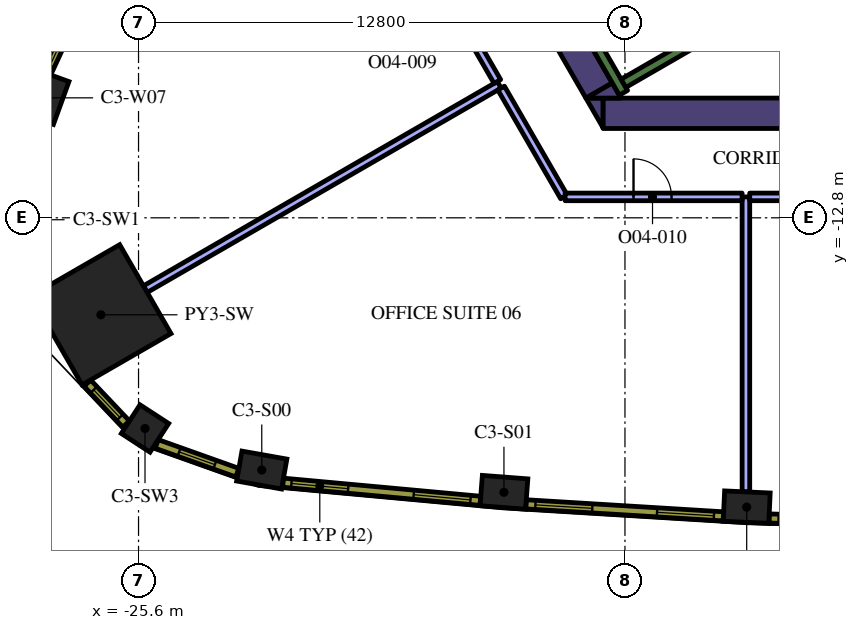
"""IFC4 building model, lengths in metres.
Left out: names, types, materials, properties, quantities, classifications, styles, units other than length and angle.
Written with IfcOpenShell. Run it as: python <this file> out.ifc"""

import sys

from ifc_helpers import new_model, si_unit, direction, frame, frame_2d, origin, origin_2d, place, context, subcontext, project, spatial, polyline, rectangle, outline, extrude, element, fill, save


model = new_model("IFC4")
c1 = context("Model", 3, precision=1e-05, world=origin(), true_north=direction((0.0, 1.0)))
c2 = subcontext(c1, "Body", "Model", "MODEL_VIEW")
j1 = project(units=[si_unit("LENGTHUNIT", "METRE"), si_unit("PLANEANGLEUNIT", "RADIAN")], contexts=[c1])
p1 = place(None, origin())
s1 = spatial("IfcSite", under=j1, at=p1, CompositionType="ELEMENT")
p2 = place(p1, origin())
s2 = spatial("IfcBuilding", under=s1, at=p2, CompositionType="ELEMENT")
p3 = place(p2, frame((0.0, 0.0, 179.4)))
s3 = spatial("IfcBuildingStorey", under=s2, at=p3, CompositionType="ELEMENT", Elevation=179.4)
p4 = place(p3, frame((-26.591, -15.352, 0.0), z_axis=(0.0, 0.0, 1.0), x_axis=(-0.866025403784, -0.5, 0.0)))
e1 = element("IfcColumn", 1, at=p4, inside=s3, PredefinedType="COLUMN", context=c2, shape_type="SweptSolid", body=[
    extrude(rectangle(XDim=2.7, YDim=2.7, at=origin_2d()), origin(), (0.0, 0.0, 1.0), 4.2),
])
for number, where, z_axis, x_axis in (
    (2, (-22.357, -19.437, 0.0), (0.0, 0.0, 1.0), (0.985, -0.175, 0.0)),
    (3, (-15.985, -20.022, 0.0), (0.0, 0.0, 1.0), (0.997, -0.076, 0.0)),
    (4, (-9.597, -20.413, 0.0), (0.0, 0.0, 1.0), (0.999, -0.046, 0.0)),
    (5, (-28.012, -9.644, 0.0), (0.0, 0.0, 1.0), (-0.341, -0.94, 0.0)),
):
    element("IfcColumn", number, at=place(p3, frame(where, z_axis=z_axis, x_axis=x_axis)), inside=s3, PredefinedType="COLUMN", context=c2, shape_type="SweptSolid", body=[
        extrude(rectangle(XDim=1.2, YDim=0.8, at=origin_2d()), origin(), (0.0, 0.0, 1.0), 4.2),
    ])
p5 = place(p3, frame((-25.43, -18.344, 0.0), z_axis=(0.0, 0.0, 1.0), x_axis=(0.838094050847, -0.545525766518, 0.0)))
e6 = element("IfcColumn", 6, at=p5, inside=s3, PredefinedType="COLUMN", context=c2, shape_type="SweptSolid", body=[
    extrude(rectangle(XDim=0.9, YDim=0.9, at=origin_2d()), origin(), (0.0, 0.0, 1.0), 4.2),
])
p6 = place(p3, frame((-13.378, -10.05, 0.0), z_axis=(0.0, 0.0, 1.0), x_axis=(1.0, 0.0, 0.0)))
e7 = element("IfcWall", 7, at=p6, inside=s3, PredefinedType="SOLIDWALL", context=c2, shape_type="SweptSolid", body=[
    extrude(rectangle(XDim=22.282, YDim=0.8, at=frame_2d((11.141, 0.0))), origin(), (0.0, 0.0, 1.0), 4.2),
])
p7 = place(p3, origin())
e8 = element("IfcWall", 8, at=p7, inside=s3, PredefinedType="SOLIDWALL", context=c2, shape_type="SweptSolid", body=[
    extrude(outline(polyline([(-13.828, -9.65), (-13.38, -9.65), (-13.38, -10.426), (-13.828, -9.65)])), origin(), (0.0, 0.0, 1.0), 4.2),
])
p8 = place(p3, frame((-15.392, -6.14, 0.0), z_axis=(0.0, 0.0, 1.0), x_axis=(0.499984020225, -0.866034629516, 0.0)))
e9 = element("IfcWall", 9, at=p8, inside=s3, PredefinedType="SOLIDWALL", context=c2, shape_type="SweptSolid", body=[
    extrude(rectangle(XDim=3.824, YDim=0.8, at=frame_2d((1.912, 0.0))), origin(), (0.0, 0.0, 1.0), 4.2),
])
e10 = element("IfcWall", 10, at=p7, inside=s3, PredefinedType="SOLIDWALL", context=c2, shape_type="SweptSolid", body=[
    extrude(outline(polyline([(-12.904, -9.65), (-13.82, -9.65), (-13.133, -9.253), (-12.904, -9.65)])), origin(), (0.0, 0.0, 1.0), 4.2),
])
p9 = place(p3, frame((-12.84, -9.511, 0.0), z_axis=(0.0, 0.0, 1.0), x_axis=(-0.499997733992, 0.866026712061, 0.0)))
e11 = element("IfcWall", 11, at=p9, inside=s3, PredefinedType="SOLIDWALL", context=c2, shape_type="SweptSolid", body=[
    extrude(rectangle(XDim=3.634, YDim=0.25, at=frame_2d((1.817, 0.0))), origin(), (0.0, 0.0, 1.0), 4.2),
])
p10 = place(p3, frame((-12.84, -9.261, 0.0), z_axis=(0.0, 0.0, 1.0), x_axis=(0.866016039709, 0.500016218704, 0.0)))
e12 = element("IfcWall", 12, at=p10, inside=s3, PredefinedType="SOLIDWALL", context=c2, shape_type="SweptSolid", body=[
    extrude(rectangle(XDim=7.05, YDim=0.25, at=frame_2d((3.525, 0.0))), origin(), (0.0, 0.0, 1.0), 4.2),
])
p11 = place(p3, frame((-9.617, -20.011, 0.0), z_axis=(0.0, 0.0, 1.0), x_axis=(0.0, 1.0, 0.0)))
e13 = element("IfcWall", 13, at=p11, inside=s3, PredefinedType="PARTITIONING", context=c2, shape_type="SweptSolid", body=[
    extrude(rectangle(XDim=7.761, YDim=0.2, at=frame_2d((3.881, 0.0))), origin(), (0.0, 0.0, 1.0), 3.15),
])
p12 = place(p3, frame((-9.517, -12.25, 0.0), z_axis=(0.0, 0.0, 1.0), x_axis=(1.0, 0.0, 0.0)))
e14 = element("IfcWall", 14, at=p12, inside=s3, PredefinedType="PARTITIONING", context=c2, shape_type="SweptSolid", body=[
    extrude(rectangle(XDim=5.987, YDim=0.2, at=frame_2d((2.994, 0.0))), origin(), (0.0, 0.0, 1.0), 3.15),
])
p13 = place(p3, frame((-16.108, -9.3, 0.0), z_axis=(0.0, 0.0, 1.0), x_axis=(-0.866027180319, -0.499996922939, 0.0)))
e15 = element("IfcWall", 15, at=p13, inside=s3, PredefinedType="PARTITIONING", context=c2, shape_type="SweptSolid", body=[
    extrude(rectangle(XDim=10.754, YDim=0.2, at=frame_2d((5.377, 0.0))), origin(), (0.0, 0.0, 1.0), 3.15),
])
p14 = place(p3, frame((-17.796, -6.376, 0.0), z_axis=(0.0, 0.0, 1.0), x_axis=(0.500001965626, -0.866024268927, 0.0)))
e16 = element("IfcWall", 16, at=p14, inside=s3, PredefinedType="PARTITIONING", context=c2, shape_type="SweptSolid", body=[
    extrude(rectangle(XDim=3.276, YDim=0.2, at=frame_2d((1.638, 0.0))), origin(), (0.0, 0.0, 1.0), 3.15),
])
p15 = place(p14, frame((1.1, 0.0, 0.0)))
e17 = element("IfcOpeningElement", 17, at=p15, cuts=e16, PredefinedType="OPENING", context=c2, shape_type="SweptSolid", body=[
    extrude(rectangle(XDim=1.0, YDim=2.1, at=frame_2d((0.5, 1.05))), frame((0.0, 0.11, 0.0), z_axis=(0.0, -1.0, 0.0), x_axis=(1.0, 0.0, 0.0)), (0.0, 0.0, 1.0), 0.22),
])
p16 = place(p3, frame((-16.058, -9.387, 0.0), z_axis=(0.0, 0.0, 1.0), x_axis=(0.500046299512, -0.865998671098, 0.0)))
e18 = element("IfcWall", 18, at=p16, inside=s3, PredefinedType="PARTITIONING", context=c2, shape_type="SweptSolid", body=[
    extrude(rectangle(XDim=3.306, YDim=0.2, at=frame_2d((1.653, 0.0))), origin(), (0.0, 0.0, 1.0), 3.15),
])
p17 = place(p3, frame((-14.375, -12.25, 0.0), z_axis=(0.0, 0.0, 1.0), x_axis=(1.0, 0.0, 0.0)))
e19 = element("IfcWall", 19, at=p17, inside=s3, PredefinedType="PARTITIONING", context=c2, shape_type="SweptSolid", body=[
    extrude(rectangle(XDim=4.658, YDim=0.2, at=frame_2d((2.329, 0.0))), origin(), (0.0, 0.0, 1.0), 3.15),
])
p18 = place(p17, frame((1.8, 0.0, 0.0)))
e20 = element("IfcOpeningElement", 20, at=p18, cuts=e19, PredefinedType="OPENING", context=c2, shape_type="SweptSolid", body=[
    extrude(rectangle(XDim=1.0, YDim=2.1, at=frame_2d((0.5, 1.05))), frame((0.0, 0.11, 0.0), z_axis=(0.0, -1.0, 0.0), x_axis=(1.0, 0.0, 0.0)), (0.0, 0.0, 1.0), 0.22),
])
p19 = place(p3, frame((-21.797, -19.77, 0.0), z_axis=(0.0, 0.0, 1.0), x_axis=(0.995808712151, -0.091460422067, 0.0)))
e21 = element("IfcWall", 21, at=p19, inside=s3, PredefinedType="SOLIDWALL", context=c2, shape_type="SweptSolid", body=[
    extrude(rectangle(XDim=5.213, YDim=0.24, at=frame_2d((2.606, 0.0))), origin(), (0.0, 0.0, 1.0), 3.95),
])
p20 = place(p19, frame((0.221, 0.0, 0.9)))
e22 = element("IfcOpeningElement", 22, at=p20, cuts=e21, PredefinedType="OPENING", context=c2, shape_type="SweptSolid", body=[
    extrude(rectangle(XDim=1.5, YDim=2.55, at=frame_2d((0.75, 1.275))), frame((0.0, 0.13, 0.0), z_axis=(0.0, -1.0, 0.0), x_axis=(1.0, 0.0, 0.0)), (0.0, 0.0, 1.0), 0.26),
])
p21 = place(p19, frame((3.452, 0.0, 0.9)))
e23 = element("IfcOpeningElement", 23, at=p21, cuts=e21, PredefinedType="OPENING", context=c2, shape_type="SweptSolid", body=[
    extrude(rectangle(XDim=1.5, YDim=2.55, at=frame_2d((0.75, 1.275))), frame((0.0, 0.13, 0.0), z_axis=(0.0, -1.0, 0.0), x_axis=(1.0, 0.0, 0.0)), (0.0, 0.0, 1.0), 0.26),
])
p22 = place(p3, frame((-15.405, -20.338, 0.0), z_axis=(0.0, 0.0, 1.0), x_axis=(0.998135294646, -0.061040425794, 0.0)))
e24 = element("IfcWall", 24, at=p22, inside=s3, PredefinedType="SOLIDWALL", context=c2, shape_type="SweptSolid", body=[
    extrude(rectangle(XDim=5.204, YDim=0.24, at=frame_2d((2.602, 0.0))), origin(), (0.0, 0.0, 1.0), 3.95),
])
p23 = place(p22, frame((0.248, 0.0, 0.9)))
e25 = element("IfcOpeningElement", 25, at=p23, cuts=e24, PredefinedType="OPENING", context=c2, shape_type="SweptSolid", body=[
    extrude(rectangle(XDim=1.5, YDim=2.55, at=frame_2d((0.75, 1.275))), frame((0.0, 0.13, 0.0), z_axis=(0.0, -1.0, 0.0), x_axis=(1.0, 0.0, 0.0)), (0.0, 0.0, 1.0), 0.26),
])
p24 = place(p22, frame((3.455, 0.0, 0.9)))
e26 = element("IfcOpeningElement", 26, at=p24, cuts=e24, PredefinedType="OPENING", context=c2, shape_type="SweptSolid", body=[
    extrude(rectangle(XDim=1.5, YDim=2.55, at=frame_2d((0.75, 1.275))), frame((0.0, 0.13, 0.0), z_axis=(0.0, -1.0, 0.0), x_axis=(1.0, 0.0, 0.0)), (0.0, 0.0, 1.0), 0.26),
])
p25 = place(p3, frame((-9.007, -20.711, 0.0), z_axis=(0.0, 0.0, 1.0), x_axis=(0.999533441983, -0.030543384845, 0.0)))
e27 = element("IfcWall", 27, at=p25, inside=s3, PredefinedType="SOLIDWALL", context=c2, shape_type="SweptSolid", body=[
    extrude(rectangle(XDim=5.204, YDim=0.24, at=frame_2d((2.602, 0.0))), origin(), (0.0, 0.0, 1.0), 3.95),
])
p26 = place(p25, frame((0.248, 0.0, 0.9)))
e28 = element("IfcOpeningElement", 28, at=p26, cuts=e27, PredefinedType="OPENING", context=c2, shape_type="SweptSolid", body=[
    extrude(rectangle(XDim=1.5, YDim=2.55, at=frame_2d((0.75, 1.275))), frame((0.0, 0.13, 0.0), z_axis=(0.0, -1.0, 0.0), x_axis=(1.0, 0.0, 0.0)), (0.0, 0.0, 1.0), 0.26),
])
p27 = place(p25, frame((3.455, 0.0, 0.9)))
e29 = element("IfcOpeningElement", 29, at=p27, cuts=e27, PredefinedType="OPENING", context=c2, shape_type="SweptSolid", body=[
    extrude(rectangle(XDim=1.5, YDim=2.55, at=frame_2d((0.75, 1.275))), frame((0.0, 0.13, 0.0), z_axis=(0.0, -1.0, 0.0), x_axis=(1.0, 0.0, 0.0)), (0.0, 0.0, 1.0), 0.26),
])
p28 = place(p3, frame((-25.837, -4.258, 0.0), z_axis=(0.0, 0.0, 1.0), x_axis=(-0.418722559465, -0.908114209885, 0.0)))
e30 = element("IfcWall", 30, at=p28, inside=s3, PredefinedType="SOLIDWALL", context=c2, shape_type="SweptSolid", body=[
    extrude(rectangle(XDim=5.213, YDim=0.24, at=frame_2d((2.606, 0.0))), origin(), (0.0, 0.0, 1.0), 3.95),
])
p29 = place(p28, frame((0.261, 0.0, 0.9)))
e31 = element("IfcOpeningElement", 31, at=p29, cuts=e30, PredefinedType="OPENING", context=c2, shape_type="SweptSolid", body=[
    extrude(rectangle(XDim=1.5, YDim=2.55, at=frame_2d((0.75, 1.275))), frame((0.0, 0.13, 0.0), z_axis=(0.0, -1.0, 0.0), x_axis=(1.0, 0.0, 0.0)), (0.0, 0.0, 1.0), 0.26),
])
p30 = place(p28, frame((3.492, 0.0, 0.9)))
e32 = element("IfcOpeningElement", 32, at=p30, cuts=e30, PredefinedType="OPENING", context=c2, shape_type="SweptSolid", body=[
    extrude(rectangle(XDim=1.5, YDim=2.55, at=frame_2d((0.75, 1.275))), frame((0.0, 0.13, 0.0), z_axis=(0.0, -1.0, 0.0), x_axis=(1.0, 0.0, 0.0)), (0.0, 0.0, 1.0), 0.26),
])
p31 = place(p3, frame((-26.946, -17.151, 0.0), z_axis=(0.0, 0.0, 1.0), x_axis=(0.687986858937, -0.725723144133, 0.0)))
e33 = element("IfcWall", 33, at=p31, inside=s3, PredefinedType="SOLIDWALL", context=c2, shape_type="SweptSolid", body=[
    extrude(rectangle(XDim=1.481, YDim=0.24, at=frame_2d((0.741, 0.0))), origin(), (0.0, 0.0, 1.0), 3.95),
])
p32 = place(p31, frame((0.241, 0.0, 0.9)))
e34 = element("IfcOpeningElement", 34, at=p32, cuts=e33, PredefinedType="OPENING", context=c2, shape_type="SweptSolid", body=[
    extrude(rectangle(XDim=1.0, YDim=2.55, at=frame_2d((0.5, 1.275))), frame((0.0, 0.13, 0.0), z_axis=(0.0, -1.0, 0.0), x_axis=(1.0, 0.0, 0.0)), (0.0, 0.0, 1.0), 0.26),
])
p33 = place(p3, frame((-25.121, -18.751, 0.0), z_axis=(0.0, 0.0, 1.0), x_axis=(0.942099727267, -0.335332825539, 0.0)))
e35 = element("IfcWall", 35, at=p33, inside=s3, PredefinedType="SOLIDWALL", context=c2, shape_type="SweptSolid", body=[
    extrude(rectangle(XDim=2.25, YDim=0.24, at=frame_2d((1.125, 0.0))), origin(), (0.0, 0.0, 1.0), 3.95),
])
p34 = place(p33, frame((0.625, 0.0, 0.9)))
e36 = element("IfcOpeningElement", 36, at=p34, cuts=e35, PredefinedType="OPENING", context=c2, shape_type="SweptSolid", body=[
    extrude(rectangle(XDim=1.0, YDim=2.55, at=frame_2d((0.5, 1.275))), frame((0.0, 0.13, 0.0), z_axis=(0.0, -1.0, 0.0), x_axis=(1.0, 0.0, 0.0)), (0.0, 0.0, 1.0), 0.26),
])
p35 = place(p18, origin())
e37 = element("IfcDoor", 37, at=p35, inside=s3, OperationType="SINGLE_SWING_LEFT", PredefinedType="DOOR", context=c2, shape_type="SweptSolid", body=[
    extrude(rectangle(XDim=1.0, YDim=2.1, at=frame_2d((0.5, 1.05))), frame((0.0, 0.025, 0.0), z_axis=(0.0, -1.0, 0.0), x_axis=(1.0, 0.0, 0.0)), (0.0, 0.0, 1.0), 0.05),
])
fill(e20, e37)
p36 = place(p20, origin())
e38 = element("IfcWindow", 38, at=p36, inside=s3, PartitioningType="SINGLE_PANEL", PredefinedType="WINDOW", context=c2, shape_type="SweptSolid", body=[
    extrude(rectangle(XDim=1.5, YDim=2.55, at=frame_2d((0.75, 1.275))), frame((0.0, 0.04, 0.0), z_axis=(0.0, -1.0, 0.0), x_axis=(1.0, 0.0, 0.0)), (0.0, 0.0, 1.0), 0.06),
])
fill(e22, e38)
p37 = place(p21, origin())
e39 = element("IfcWindow", 39, at=p37, inside=s3, PartitioningType="SINGLE_PANEL", PredefinedType="WINDOW", context=c2, shape_type="SweptSolid", body=[
    extrude(rectangle(XDim=1.5, YDim=2.55, at=frame_2d((0.75, 1.275))), frame((0.0, 0.04, 0.0), z_axis=(0.0, -1.0, 0.0), x_axis=(1.0, 0.0, 0.0)), (0.0, 0.0, 1.0), 0.06),
])
fill(e23, e39)
p38 = place(p23, origin())
e40 = element("IfcWindow", 40, at=p38, inside=s3, PartitioningType="SINGLE_PANEL", PredefinedType="WINDOW", context=c2, shape_type="SweptSolid", body=[
    extrude(rectangle(XDim=1.5, YDim=2.55, at=frame_2d((0.75, 1.275))), frame((0.0, 0.04, 0.0), z_axis=(0.0, -1.0, 0.0), x_axis=(1.0, 0.0, 0.0)), (0.0, 0.0, 1.0), 0.06),
])
fill(e25, e40)
p39 = place(p24, origin())
e41 = element("IfcWindow", 41, at=p39, inside=s3, PartitioningType="SINGLE_PANEL", PredefinedType="WINDOW", context=c2, shape_type="SweptSolid", body=[
    extrude(rectangle(XDim=1.5, YDim=2.55, at=frame_2d((0.75, 1.275))), frame((0.0, 0.04, 0.0), z_axis=(0.0, -1.0, 0.0), x_axis=(1.0, 0.0, 0.0)), (0.0, 0.0, 1.0), 0.06),
])
fill(e26, e41)
p40 = place(p26, origin())
e42 = element("IfcWindow", 42, at=p40, inside=s3, PartitioningType="SINGLE_PANEL", PredefinedType="WINDOW", context=c2, shape_type="SweptSolid", body=[
    extrude(rectangle(XDim=1.5, YDim=2.55, at=frame_2d((0.75, 1.275))), frame((0.0, 0.04, 0.0), z_axis=(0.0, -1.0, 0.0), x_axis=(1.0, 0.0, 0.0)), (0.0, 0.0, 1.0), 0.06),
])
fill(e28, e42)
p41 = place(p30, origin())
e43 = element("IfcWindow", 43, at=p41, inside=s3, PartitioningType="SINGLE_PANEL", PredefinedType="WINDOW", context=c2, shape_type="SweptSolid", body=[
    extrude(rectangle(XDim=1.5, YDim=2.55, at=frame_2d((0.75, 1.275))), frame((0.0, 0.04, 0.0), z_axis=(0.0, -1.0, 0.0), x_axis=(1.0, 0.0, 0.0)), (0.0, 0.0, 1.0), 0.06),
])
fill(e32, e43)
p42 = place(p32, origin())
e44 = element("IfcWindow", 44, at=p42, inside=s3, PartitioningType="SINGLE_PANEL", PredefinedType="WINDOW", context=c2, shape_type="SweptSolid", body=[
    extrude(rectangle(XDim=1.0, YDim=2.55, at=frame_2d((0.5, 1.275))), frame((0.0, 0.04, 0.0), z_axis=(0.0, -1.0, 0.0), x_axis=(1.0, 0.0, 0.0)), (0.0, 0.0, 1.0), 0.06),
])
fill(e34, e44)
p43 = place(p34, origin())
e45 = element("IfcWindow", 45, at=p43, inside=s3, PartitioningType="SINGLE_PANEL", PredefinedType="WINDOW", context=c2, shape_type="SweptSolid", body=[
    extrude(rectangle(XDim=1.0, YDim=2.55, at=frame_2d((0.5, 1.275))), frame((0.0, 0.04, 0.0), z_axis=(0.0, -1.0, 0.0), x_axis=(1.0, 0.0, 0.0)), (0.0, 0.0, 1.0), 0.06),
])
fill(e36, e45)
save(model, sys.argv[1])
